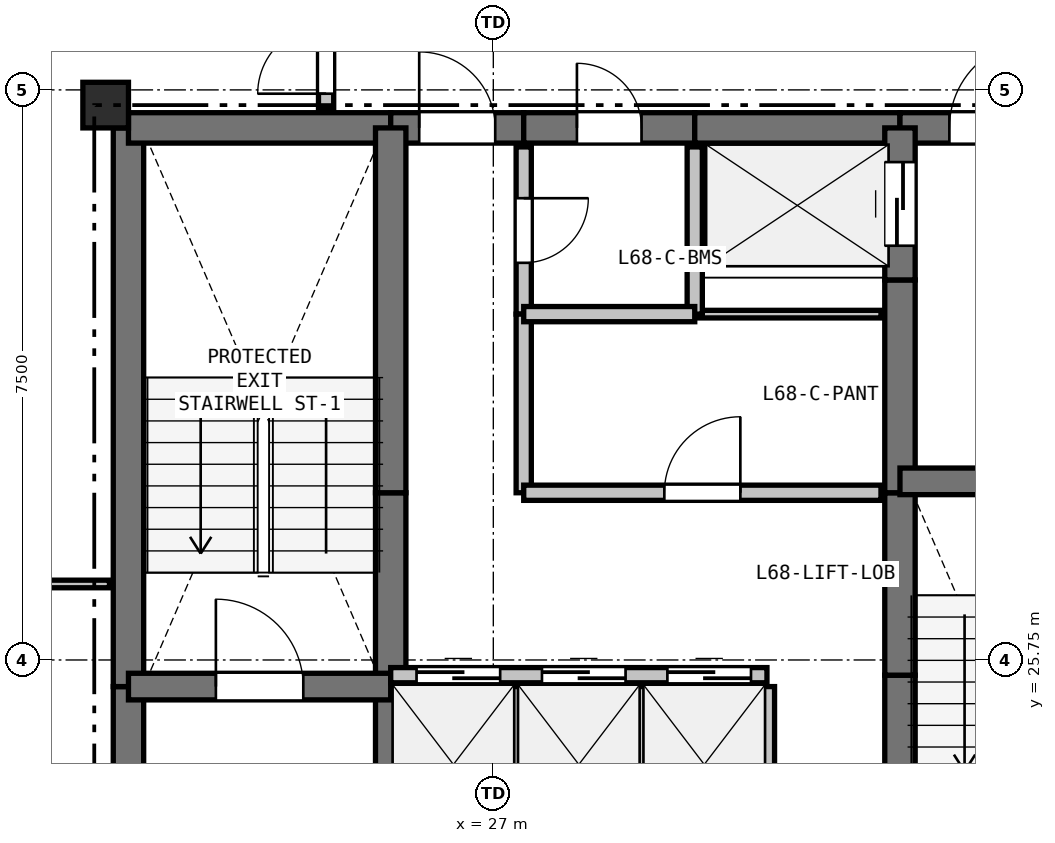
"""IFC4 building model, lengths in metres.
Left out: names, types, materials, properties, quantities, classifications, styles, units other than length and angle.
Written with IfcOpenShell. Run it as: python <this file> out.ifc"""

import sys

from ifc_helpers import new_model, si_unit, direction, frame, frame_2d, origin, origin_2d, place, context, subcontext, project, spatial, rectangle, extrude, element, fill, save


model = new_model("IFC4")
c1 = context("Model", 3, precision=1e-05, world=origin(), true_north=direction((0.0, 1.0)))
c2 = subcontext(c1, "Body", "Model", "MODEL_VIEW")
j1 = project(units=[si_unit("LENGTHUNIT", "METRE"), si_unit("PLANEANGLEUNIT", "RADIAN")], contexts=[c1])
p1 = place(None, origin())
s1 = spatial("IfcSite", under=j1, at=p1, CompositionType="ELEMENT")
p2 = place(p1, origin())
s2 = spatial("IfcBuilding", under=s1, at=p2, CompositionType="ELEMENT")
p3 = place(p2, frame((0.0, 0.0, 243.0)))
s3 = spatial("IfcBuildingStorey", under=s2, at=p3, CompositionType="ELEMENT", Elevation=243.0)
p4 = place(p3, frame((21.9, 33.05, 0.0), z_axis=(0.0, 0.0, 1.0), x_axis=(1.0, 0.0, 0.0)))
e1 = element("IfcColumn", 1, at=p4, inside=s3, PredefinedType="COLUMN", context=c2, shape_type="SweptSolid", body=[
    extrude(rectangle(XDim=0.6, YDim=0.6, at=origin_2d()), origin(), (0.0, 0.0, 1.0), 3.3),
])
p5 = place(p3, frame((22.2, 20.75, 0.0), z_axis=(0.0, 0.0, 1.0), x_axis=(0.0, 1.0, 0.0)))
e2 = element("IfcWall", 2, at=p5, inside=s3, PredefinedType="SHEAR", context=c2, shape_type="SweptSolid", body=[
    extrude(rectangle(XDim=4.65, YDim=0.4, at=frame_2d((2.325, 0.0))), origin(), (0.0, 0.0, 1.0), 3.08),
])
p6 = place(p3, frame((22.2, 25.4, 0.0), z_axis=(0.0, 0.0, 1.0), x_axis=(0.0, 1.0, 0.0)))
e3 = element("IfcWall", 3, at=p6, inside=s3, PredefinedType="SHEAR", context=c2, shape_type="SweptSolid", body=[
    extrude(rectangle(XDim=7.35, YDim=0.4, at=frame_2d((3.675, 0.0))), origin(), (0.0, 0.0, 1.0), 3.08),
])
p7 = place(p3, frame((22.2, 32.75, 0.0), z_axis=(0.0, 0.0, 1.0), x_axis=(1.0, 0.0, 0.0)))
e4 = element("IfcWall", 4, at=p7, inside=s3, PredefinedType="SHEAR", context=c2, shape_type="SweptSolid", body=[
    extrude(rectangle(XDim=3.45, YDim=0.4, at=frame_2d((1.725, 0.0))), origin(), (0.0, 0.0, 1.0), 3.08),
])
p8 = place(p3, frame((25.65, 32.75, 0.0), z_axis=(0.0, 0.0, 1.0), x_axis=(1.0, 0.0, 0.0)))
e5 = element("IfcWall", 5, at=p8, inside=s3, PredefinedType="SHEAR", context=c2, shape_type="SweptSolid", body=[
    extrude(rectangle(XDim=1.75, YDim=0.4, at=frame_2d((0.875, 0.0))), origin(), (0.0, 0.0, 1.0), 3.08),
])
p9 = place(p8, frame((0.375, 0.0, 0.0)))
e6 = element("IfcOpeningElement", 6, at=p9, cuts=e5, PredefinedType="OPENING", context=c2, shape_type="SweptSolid", body=[
    extrude(rectangle(XDim=1.0, YDim=2.15, at=frame_2d((0.5, 1.075))), frame((0.0, 0.21, 0.0), z_axis=(0.0, -1.0, 0.0), x_axis=(1.0, 0.0, 0.0)), (0.0, 0.0, 1.0), 0.42),
])
p10 = place(p3, frame((27.4, 32.75, 0.0), z_axis=(0.0, 0.0, 1.0), x_axis=(1.0, 0.0, 0.0)))
e7 = element("IfcWall", 7, at=p10, inside=s3, PredefinedType="SHEAR", context=c2, shape_type="SweptSolid", body=[
    extrude(rectangle(XDim=2.25, YDim=0.4, at=frame_2d((1.125, 0.0))), origin(), (0.0, 0.0, 1.0), 3.08),
])
p11 = place(p10, frame((0.7, 0.0, 0.0)))
e8 = element("IfcOpeningElement", 8, at=p11, cuts=e7, PredefinedType="OPENING", context=c2, shape_type="SweptSolid", body=[
    extrude(rectangle(XDim=0.85, YDim=2.1, at=frame_2d((0.425, 1.05))), frame((0.0, 0.21, 0.0), z_axis=(0.0, -1.0, 0.0), x_axis=(1.0, 0.0, 0.0)), (0.0, 0.0, 1.0), 0.42),
])
p12 = place(p3, frame((29.65, 32.75, 0.0), z_axis=(0.0, 0.0, 1.0), x_axis=(1.0, 0.0, 0.0)))
e9 = element("IfcWall", 9, at=p12, inside=s3, PredefinedType="SHEAR", context=c2, shape_type="SweptSolid", body=[
    extrude(rectangle(XDim=2.7, YDim=0.4, at=frame_2d((1.35, 0.0))), origin(), (0.0, 0.0, 1.0), 3.08),
])
p13 = place(p3, frame((32.35, 32.75, 0.0), z_axis=(0.0, 0.0, 1.0), x_axis=(1.0, 0.0, 0.0)))
e10 = element("IfcWall", 10, at=p13, inside=s3, PredefinedType="SHEAR", context=c2, shape_type="SweptSolid", body=[
    extrude(rectangle(XDim=3.45, YDim=0.4, at=frame_2d((1.725, 0.0))), origin(), (0.0, 0.0, 1.0), 3.08),
])
p14 = place(p13, frame((0.65, 0.0, 0.0)))
e11 = element("IfcOpeningElement", 11, at=p14, cuts=e10, PredefinedType="OPENING", context=c2, shape_type="SweptSolid", body=[
    extrude(rectangle(XDim=1.15, YDim=2.15, at=frame_2d((0.575, 1.075))), frame((0.0, 0.21, 0.0), z_axis=(0.0, -1.0, 0.0), x_axis=(1.0, 0.0, 0.0)), (0.0, 0.0, 1.0), 0.42),
])
p15 = place(p3, frame((25.65, 22.75, 0.0), z_axis=(0.0, 0.0, 1.0), x_axis=(0.0, 1.0, 0.0)))
e12 = element("IfcWall", 12, at=p15, inside=s3, PredefinedType="SHEAR", context=c2, shape_type="SweptSolid", body=[
    extrude(rectangle(XDim=2.8, YDim=0.4, at=frame_2d((1.4, 0.0))), origin(), (0.0, 0.0, 1.0), 3.08),
])
p16 = place(p3, frame((25.65, 25.55, 0.0), z_axis=(0.0, 0.0, 1.0), x_axis=(0.0, 1.0, 0.0)))
e13 = element("IfcWall", 13, at=p16, inside=s3, PredefinedType="SHEAR", context=c2, shape_type="SweptSolid", body=[
    extrude(rectangle(XDim=2.4, YDim=0.4, at=frame_2d((1.2, 0.0))), origin(), (0.0, 0.0, 1.0), 3.08),
])
for number, where, z_axis, x_axis in (
    (14, (25.65, 27.95, 0.0), (0.0, 0.0, 1.0), (0.0, 1.0, 0.0)),
    (15, (32.35, 20.75, 0.0), (0.0, 0.0, 1.0), (0.0, 1.0, 0.0)),
):
    element("IfcWall", number, at=place(p3, frame(where, z_axis=z_axis, x_axis=x_axis)), inside=s3, PredefinedType="SHEAR", context=c2, shape_type="SweptSolid", body=[
        extrude(rectangle(XDim=4.8, YDim=0.4, at=frame_2d((2.4, 0.0))), origin(), (0.0, 0.0, 1.0), 3.08),
    ])
p17 = place(p3, frame((32.35, 25.55, 0.0), z_axis=(0.0, 0.0, 1.0), x_axis=(0.0, 1.0, 0.0)))
e16 = element("IfcWall", 16, at=p17, inside=s3, PredefinedType="SHEAR", context=c2, shape_type="SweptSolid", body=[
    extrude(rectangle(XDim=2.4, YDim=0.4, at=frame_2d((1.2, 0.0))), origin(), (0.0, 0.0, 1.0), 3.08),
])
p18 = place(p3, frame((32.35, 27.95, 0.0), z_axis=(0.0, 0.0, 1.0), x_axis=(0.0, 1.0, 0.0)))
e17 = element("IfcWall", 17, at=p18, inside=s3, PredefinedType="SHEAR", context=c2, shape_type="SweptSolid", body=[
    extrude(rectangle(XDim=2.8, YDim=0.4, at=frame_2d((1.4, 0.0))), origin(), (0.0, 0.0, 1.0), 3.08),
])
p19 = place(p3, frame((32.35, 30.75, 0.0), z_axis=(0.0, 0.0, 1.0), x_axis=(0.0, 1.0, 0.0)))
e18 = element("IfcWall", 18, at=p19, inside=s3, PredefinedType="SHEAR", context=c2, shape_type="SweptSolid", body=[
    extrude(rectangle(XDim=2.0, YDim=0.4, at=frame_2d((1.0, 0.0))), origin(), (0.0, 0.0, 1.0), 3.08),
])
p20 = place(p19, frame((0.45, 0.0, 0.0)))
e19 = element("IfcOpeningElement", 19, at=p20, cuts=e18, PredefinedType="OPENING", context=c2, shape_type="SweptSolid", body=[
    extrude(rectangle(XDim=1.1, YDim=2.15, at=frame_2d((0.55, 1.075))), frame((0.0, 0.21, 0.0), z_axis=(0.0, -1.0, 0.0), x_axis=(1.0, 0.0, 0.0)), (0.0, 0.0, 1.0), 0.42),
])
p21 = place(p3, frame((22.2, 25.4, 0.0), z_axis=(0.0, 0.0, 1.0), x_axis=(1.0, 0.0, 0.0)))
e20 = element("IfcWall", 20, at=p21, inside=s3, PredefinedType="SHEAR", context=c2, shape_type="SweptSolid", body=[
    extrude(rectangle(XDim=3.45, YDim=0.35, at=frame_2d((1.725, 0.0))), origin(), (0.0, 0.0, 1.0), 3.08),
])
p22 = place(p21, frame((1.15, 0.0, 0.0)))
e21 = element("IfcOpeningElement", 21, at=p22, cuts=e20, PredefinedType="OPENING", context=c2, shape_type="SweptSolid", body=[
    extrude(rectangle(XDim=1.15, YDim=2.15, at=frame_2d((0.575, 1.075))), frame((0.0, 0.185, 0.0), z_axis=(0.0, -1.0, 0.0), x_axis=(1.0, 0.0, 0.0)), (0.0, 0.0, 1.0), 0.37),
])
p23 = place(p3, frame((32.35, 28.1, 0.0), z_axis=(0.0, 0.0, 1.0), x_axis=(1.0, 0.0, 0.0)))
e22 = element("IfcWall", 22, at=p23, inside=s3, PredefinedType="SHEAR", context=c2, shape_type="SweptSolid", body=[
    extrude(rectangle(XDim=3.45, YDim=0.35, at=frame_2d((1.725, 0.0))), origin(), (0.0, 0.0, 1.0), 3.08),
])
p24 = place(p23, frame((1.15, 0.0, 0.0)))
e23 = element("IfcOpeningElement", 23, at=p24, cuts=e22, PredefinedType="OPENING", context=c2, shape_type="SweptSolid", body=[
    extrude(rectangle(XDim=1.15, YDim=2.15, at=frame_2d((0.575, 1.075))), frame((0.0, 0.185, 0.0), z_axis=(0.0, -1.0, 0.0), x_axis=(1.0, 0.0, 0.0)), (0.0, 0.0, 1.0), 0.37),
])
p25 = place(p3, frame((25.65, 25.55, 0.0), z_axis=(0.0, 0.0, 1.0), x_axis=(1.0, 0.0, 0.0)))
e24 = element("IfcWall", 24, at=p25, inside=s3, PredefinedType="PARTITIONING", context=c2, shape_type="SweptSolid", body=[
    extrude(rectangle(XDim=4.95, YDim=0.2, at=frame_2d((2.475, 0.0))), origin(), (0.0, 0.0, 1.0), 3.08),
])
p26 = place(p25, frame((0.34, 0.0, 0.0)))
e25 = element("IfcOpeningElement", 25, at=p26, cuts=e24, PredefinedType="OPENING", context=c2, shape_type="SweptSolid", body=[
    extrude(rectangle(XDim=1.1, YDim=2.15, at=frame_2d((0.55, 1.075))), frame((0.0, 0.11, 0.0), z_axis=(0.0, -1.0, 0.0), x_axis=(1.0, 0.0, 0.0)), (0.0, 0.0, 1.0), 0.22),
])
p27 = place(p25, frame((1.99, 0.0, 0.0)))
e26 = element("IfcOpeningElement", 26, at=p27, cuts=e24, PredefinedType="OPENING", context=c2, shape_type="SweptSolid", body=[
    extrude(rectangle(XDim=1.1, YDim=2.15, at=frame_2d((0.55, 1.075))), frame((0.0, 0.11, 0.0), z_axis=(0.0, -1.0, 0.0), x_axis=(1.0, 0.0, 0.0)), (0.0, 0.0, 1.0), 0.22),
])
p28 = place(p25, frame((3.64, 0.0, 0.0)))
e27 = element("IfcOpeningElement", 27, at=p28, cuts=e24, PredefinedType="OPENING", context=c2, shape_type="SweptSolid", body=[
    extrude(rectangle(XDim=1.1, YDim=2.15, at=frame_2d((0.55, 1.075))), frame((0.0, 0.11, 0.0), z_axis=(0.0, -1.0, 0.0), x_axis=(1.0, 0.0, 0.0)), (0.0, 0.0, 1.0), 0.22),
])
p29 = place(p3, frame((32.1, 30.3, 0.0), z_axis=(0.0, 0.0, 1.0), x_axis=(-1.0, 0.0, 0.0)))
e28 = element("IfcWall", 28, at=p29, inside=s3, PredefinedType="PARTITIONING", context=c2, shape_type="SweptSolid", body=[
    extrude(rectangle(XDim=2.45, YDim=0.1, at=frame_2d((1.225, 0.0))), origin(), (0.0, 0.0, 1.0), 3.08),
])
p30 = place(p3, frame((29.65, 30.3, 0.0), z_axis=(0.0, 0.0, 1.0), x_axis=(0.0, 1.0, 0.0)))
e29 = element("IfcWall", 29, at=p30, inside=s3, PredefinedType="PARTITIONING", context=c2, shape_type="SweptSolid", body=[
    extrude(rectangle(XDim=2.2, YDim=0.2, at=frame_2d((1.1, 0.0))), origin(), (0.0, 0.0, 1.0), 3.08),
])
p31 = place(p3, frame((27.3, 25.4, 0.0), z_axis=(0.0, 0.0, 1.0), x_axis=(0.0, -1.0, 0.0)))
e30 = element("IfcWall", 30, at=p31, inside=s3, PredefinedType="PARTITIONING", context=c2, shape_type="SweptSolid", body=[
    extrude(rectangle(XDim=2.2, YDim=0.1, at=frame_2d((1.1, 0.0))), origin(), (0.0, 0.0, 1.0), 3.08),
])
p32 = place(p3, frame((28.95, 25.4, 0.0), z_axis=(0.0, 0.0, 1.0), x_axis=(0.0, -1.0, 0.0)))
e31 = element("IfcWall", 31, at=p32, inside=s3, PredefinedType="PARTITIONING", context=c2, shape_type="SweptSolid", body=[
    extrude(rectangle(XDim=2.2, YDim=0.125, at=frame_2d((1.1, 0.0))), origin(), (0.0, 0.0, 1.0), 3.08),
])
p33 = place(p3, frame((30.6, 25.4, 0.0), z_axis=(0.0, 0.0, 1.0), x_axis=(0.0, -1.0, 0.0)))
e32 = element("IfcWall", 32, at=p33, inside=s3, PredefinedType="PARTITIONING", context=c2, shape_type="SweptSolid", body=[
    extrude(rectangle(XDim=2.2, YDim=0.2, at=frame_2d((1.1, 0.0))), origin(), (0.0, 0.0, 1.0), 3.08),
])
p34 = place(p3, frame((27.4, 32.5, 0.0), z_axis=(0.0, 0.0, 1.0), x_axis=(0.0, -1.0, 0.0)))
e33 = element("IfcWall", 33, at=p34, inside=s3, PredefinedType="PARTITIONING", context=c2, shape_type="SweptSolid", body=[
    extrude(rectangle(XDim=2.2, YDim=0.2, at=frame_2d((1.1, 0.0))), origin(), (0.0, 0.0, 1.0), 3.08),
])
p35 = place(p34, frame((0.675, 0.0, 0.0)))
e34 = element("IfcOpeningElement", 34, at=p35, cuts=e33, PredefinedType="OPENING", context=c2, shape_type="SweptSolid", body=[
    extrude(rectangle(XDim=0.85, YDim=2.1, at=frame_2d((0.425, 1.05))), frame((0.0, 0.11, 0.0), z_axis=(0.0, -1.0, 0.0), x_axis=(1.0, 0.0, 0.0)), (0.0, 0.0, 1.0), 0.22),
])
p36 = place(p3, frame((27.4, 30.3, 0.0), z_axis=(0.0, 0.0, 1.0), x_axis=(0.0, -1.0, 0.0)))
e35 = element("IfcWall", 35, at=p36, inside=s3, PredefinedType="PARTITIONING", context=c2, shape_type="SweptSolid", body=[
    extrude(rectangle(XDim=2.35, YDim=0.2, at=frame_2d((1.175, 0.0))), origin(), (0.0, 0.0, 1.0), 3.08),
])
p37 = place(p3, frame((27.4, 27.95, 0.0), z_axis=(0.0, 0.0, 1.0), x_axis=(1.0, 0.0, 0.0)))
e36 = element("IfcWall", 36, at=p37, inside=s3, PredefinedType="PARTITIONING", context=c2, shape_type="SweptSolid", body=[
    extrude(rectangle(XDim=4.7, YDim=0.2, at=frame_2d((2.35, 0.0))), origin(), (0.0, 0.0, 1.0), 3.08),
])
p38 = place(p37, frame((1.85, 0.0, 0.0)))
e37 = element("IfcOpeningElement", 37, at=p38, cuts=e36, PredefinedType="OPENING", context=c2, shape_type="SweptSolid", body=[
    extrude(rectangle(XDim=1.0, YDim=2.15, at=frame_2d((0.5, 1.075))), frame((0.0, 0.11, 0.0), z_axis=(0.0, -1.0, 0.0), x_axis=(1.0, 0.0, 0.0)), (0.0, 0.0, 1.0), 0.22),
])
p39 = place(p3, frame((24.8, 33.0, 0.0), z_axis=(0.0, 0.0, 1.0), x_axis=(0.0, 1.0, 0.0)))
e38 = element("IfcWall", 38, at=p39, inside=s3, PredefinedType="PARTITIONING", context=c2, shape_type="SweptSolid", body=[
    extrude(rectangle(XDim=2.2, YDim=0.2, at=frame_2d((1.1, 0.0))), origin(), (0.0, 0.0, 1.0), 2.605),
])
p40 = place(p39, frame((0.2, 0.0, 0.0)))
e39 = element("IfcOpeningElement", 39, at=p40, cuts=e38, PredefinedType="OPENING", context=c2, shape_type="SweptSolid", body=[
    extrude(rectangle(XDim=1.8, YDim=2.2, at=frame_2d((0.9, 1.1))), frame((0.0, 0.11, 0.0), z_axis=(0.0, -1.0, 0.0), x_axis=(1.0, 0.0, 0.0)), (0.0, 0.0, 1.0), 0.22),
])
p41 = place(p3, frame((27.4, 30.3, 0.0), z_axis=(0.0, 0.0, 1.0), x_axis=(1.0, 0.0, 0.0)))
e40 = element("IfcWall", 40, at=p41, inside=s3, PredefinedType="PARTITIONING", context=c2, shape_type="SweptSolid", body=[
    extrude(rectangle(XDim=2.25, YDim=0.2, at=frame_2d((1.125, 0.0))), origin(), (0.0, 0.0, 1.0), 3.08),
])
p42 = place(p3, frame((21.95, 26.75, 0.0), z_axis=(0.0, 0.0, 1.0), x_axis=(-1.0, 0.0, 0.0)))
e41 = element("IfcWall", 41, at=p42, inside=s3, PredefinedType="PARTITIONING", context=c2, shape_type="SweptSolid", body=[
    extrude(rectangle(XDim=11.082, YDim=0.1, at=frame_2d((5.541, 0.0))), origin(), (0.0, 0.0, 1.0), 2.605),
])
p43 = place(p26, origin())
e42 = element("IfcDoor", 42, at=p43, inside=s3, OperationType="SLIDING_TO_LEFT", PredefinedType="DOOR", context=c2, shape_type="SweptSolid", body=[
    extrude(rectangle(XDim=1.1, YDim=2.15, at=frame_2d((0.55, 1.075))), frame((0.0, 0.025, 0.0), z_axis=(0.0, -1.0, 0.0), x_axis=(1.0, 0.0, 0.0)), (0.0, 0.0, 1.0), 0.05),
])
fill(e25, e42)
p44 = place(p27, origin())
e43 = element("IfcDoor", 43, at=p44, inside=s3, OperationType="SLIDING_TO_LEFT", PredefinedType="DOOR", context=c2, shape_type="SweptSolid", body=[
    extrude(rectangle(XDim=1.1, YDim=2.15, at=frame_2d((0.55, 1.075))), frame((0.0, 0.025, 0.0), z_axis=(0.0, -1.0, 0.0), x_axis=(1.0, 0.0, 0.0)), (0.0, 0.0, 1.0), 0.05),
])
fill(e26, e43)
p45 = place(p28, origin())
e44 = element("IfcDoor", 44, at=p45, inside=s3, OperationType="SLIDING_TO_LEFT", PredefinedType="DOOR", context=c2, shape_type="SweptSolid", body=[
    extrude(rectangle(XDim=1.1, YDim=2.15, at=frame_2d((0.55, 1.075))), frame((0.0, 0.025, 0.0), z_axis=(0.0, -1.0, 0.0), x_axis=(1.0, 0.0, 0.0)), (0.0, 0.0, 1.0), 0.05),
])
fill(e27, e44)
p46 = place(p9, origin())
e45 = element("IfcDoor", 45, at=p46, inside=s3, OperationType="SINGLE_SWING_LEFT", PredefinedType="DOOR", context=c2, shape_type="SweptSolid", body=[
    extrude(rectangle(XDim=1.0, YDim=2.15, at=frame_2d((0.5, 1.075))), frame((0.0, 0.025, 0.0), z_axis=(0.0, -1.0, 0.0), x_axis=(1.0, 0.0, 0.0)), (0.0, 0.0, 1.0), 0.05),
])
fill(e6, e45)
p47 = place(p20, origin())
e46 = element("IfcDoor", 46, at=p47, inside=s3, OperationType="SLIDING_TO_LEFT", PredefinedType="DOOR", context=c2, shape_type="SweptSolid", body=[
    extrude(rectangle(XDim=1.1, YDim=2.15, at=frame_2d((0.55, 1.075))), frame((0.0, 0.025, 0.0), z_axis=(0.0, -1.0, 0.0), x_axis=(1.0, 0.0, 0.0)), (0.0, 0.0, 1.0), 0.05),
])
fill(e19, e46)
p48 = place(p22, origin())
e47 = element("IfcDoor", 47, at=p48, inside=s3, OperationType="SINGLE_SWING_LEFT", PredefinedType="DOOR", context=c2, shape_type="SweptSolid", body=[
    extrude(rectangle(XDim=1.15, YDim=2.15, at=frame_2d((0.575, 1.075))), frame((0.0, 0.025, 0.0), z_axis=(0.0, -1.0, 0.0), x_axis=(1.0, 0.0, 0.0)), (0.0, 0.0, 1.0), 0.05),
])
fill(e21, e47)
p49 = place(p14, origin())
e48 = element("IfcDoor", 48, at=p49, inside=s3, OperationType="SINGLE_SWING_RIGHT", PredefinedType="DOOR", context=c2, shape_type="SweptSolid", body=[
    extrude(rectangle(XDim=1.15, YDim=2.15, at=frame_2d((0.575, 1.075))), frame((0.0, 0.025, 0.0), z_axis=(0.0, -1.0, 0.0), x_axis=(1.0, 0.0, 0.0)), (0.0, 0.0, 1.0), 0.05),
])
fill(e11, e48)
p50 = place(p38, origin())
e49 = element("IfcDoor", 49, at=p50, inside=s3, OperationType="SINGLE_SWING_RIGHT", PredefinedType="DOOR", context=c2, shape_type="SweptSolid", body=[
    extrude(rectangle(XDim=1.0, YDim=2.15, at=frame_2d((0.5, 1.075))), frame((0.0, 0.025, 0.0), z_axis=(0.0, -1.0, 0.0), x_axis=(1.0, 0.0, 0.0)), (0.0, 0.0, 1.0), 0.05),
])
fill(e37, e49)
p51 = place(p35, origin())
e50 = element("IfcDoor", 50, at=p51, inside=s3, OperationType="SINGLE_SWING_LEFT", PredefinedType="DOOR", context=c2, shape_type="SweptSolid", body=[
    extrude(rectangle(XDim=0.85, YDim=2.1, at=frame_2d((0.425, 1.05))), frame((0.0, 0.025, 0.0), z_axis=(0.0, -1.0, 0.0), x_axis=(1.0, 0.0, 0.0)), (0.0, 0.0, 1.0), 0.05),
])
fill(e34, e50)
p52 = place(p11, origin())
e51 = element("IfcDoor", 51, at=p52, inside=s3, OperationType="SINGLE_SWING_LEFT", PredefinedType="DOOR", context=c2, shape_type="SweptSolid", body=[
    extrude(rectangle(XDim=0.85, YDim=2.1, at=frame_2d((0.425, 1.05))), frame((0.0, 0.025, 0.0), z_axis=(0.0, -1.0, 0.0), x_axis=(1.0, 0.0, 0.0)), (0.0, 0.0, 1.0), 0.05),
])
fill(e8, e51)
p53 = place(p40, origin())
e52 = element("IfcDoor", 52, at=p53, inside=s3, OperationType="DOUBLE_DOOR_SINGLE_SWING", PredefinedType="DOOR", context=c2, shape_type="SweptSolid", body=[
    extrude(rectangle(XDim=1.8, YDim=2.2, at=frame_2d((0.9, 1.1))), frame((0.0, 0.025, 0.0), z_axis=(0.0, -1.0, 0.0), x_axis=(1.0, 0.0, 0.0)), (0.0, 0.0, 1.0), 0.05),
])
fill(e39, e52)
save(model, sys.argv[1])
